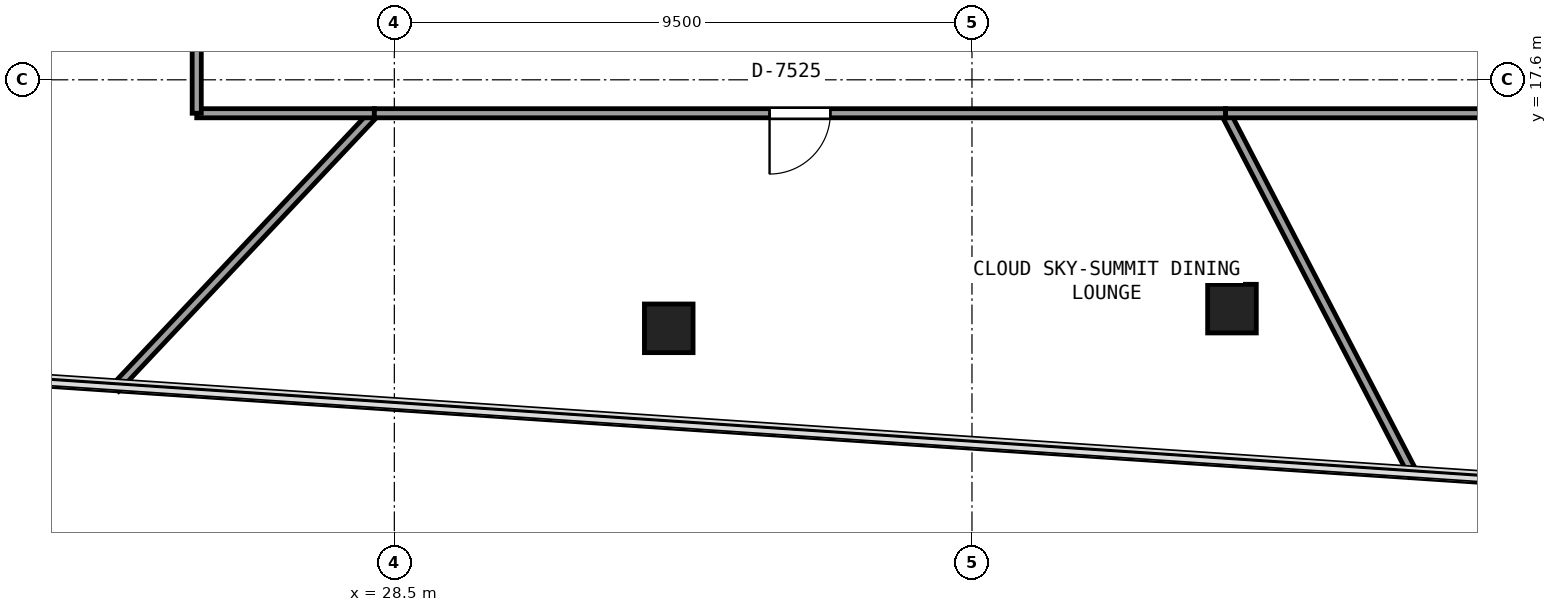
"""IFC4 building model, lengths in metres.
Left out: names, types, materials, properties, quantities, classifications, styles, units other than length and angle.
Written with IfcOpenShell. Run it as: python <this file> out.ifc"""

import sys

from ifc_helpers import new_model, si_unit, direction, frame, frame_2d, origin, origin_2d, place, context, subcontext, project, spatial, rectangle, extrude, element, fill, save


model = new_model("IFC4")
c1 = context("Model", 3, precision=1e-05, world=origin(), true_north=direction((0.0, 1.0)))
c2 = subcontext(c1, "Body", "Model", "MODEL_VIEW")
j1 = project(units=[si_unit("LENGTHUNIT", "METRE"), si_unit("PLANEANGLEUNIT", "RADIAN")], contexts=[c1])
p1 = place(None, origin())
s1 = spatial("IfcSite", under=j1, at=p1, CompositionType="ELEMENT")
p2 = place(p1, origin())
s2 = spatial("IfcBuilding", under=s1, at=p2, CompositionType="ELEMENT")
p3 = place(p2, frame((0.0, 0.0, 279.3)))
s3 = spatial("IfcBuildingStorey", under=s2, at=p3, CompositionType="ELEMENT", Elevation=279.3)
for number, where, z_axis, x_axis in (
    (1, (33.013, 13.513, 0.0), (0.0, 0.0, 1.0), (1.0, 0.0, 0.0)),
    (2, (42.276, 13.837, 0.0), (0.0, 0.0, 1.0), (1.0, 0.0, 0.0)),
):
    element("IfcColumn", number, at=place(p3, frame(where, z_axis=z_axis, x_axis=x_axis)), inside=s3, PredefinedType="COLUMN", context=c2, shape_type="SweptSolid", body=[
        extrude(rectangle(XDim=0.8, YDim=0.8, at=origin_2d()), origin(), (0.0, 0.0, 1.0), 3.84),
    ])
p4 = place(p3, frame((23.911, 12.529, 0.0), z_axis=(0.0, 0.0, 1.0), x_axis=(0.685787534891, 0.727801797874, 0.0)))
e3 = element("IfcWall", 3, at=p4, inside=s3, PredefinedType="PARTITIONING", context=c2, shape_type="SweptSolid", body=[
    extrude(rectangle(XDim=6.212, YDim=0.15, at=frame_2d((3.106, 0.0))), origin(), (0.0, 0.0, 1.0), 3.84),
])
p5 = place(p3, frame((28.171, 17.05, 0.0), z_axis=(0.0, 0.0, 1.0), x_axis=(-1.0, 0.0, 0.0)))
e4 = element("IfcWall", 4, at=p5, inside=s3, PredefinedType="PARTITIONING", context=c2, shape_type="SweptSolid", body=[
    extrude(rectangle(XDim=2.921, YDim=0.15, at=frame_2d((1.46, 0.0))), origin(), (0.0, 0.0, 1.0), 3.84),
])
p6 = place(p3, frame((25.25, 17.05, 0.0), z_axis=(0.0, 0.0, 1.0), x_axis=(0.0, 1.0, 0.0)))
e5 = element("IfcWall", 5, at=p6, inside=s3, PredefinedType="PARTITIONING", context=c2, shape_type="SweptSolid", body=[
    extrude(rectangle(XDim=15.178, YDim=0.15, at=frame_2d((7.589, 0.0))), origin(), (0.0, 0.0, 1.0), 3.289),
])
p7 = place(p6, frame((7.089, 0.0, 0.0)))
e6 = element("IfcOpeningElement", 6, at=p7, cuts=e5, PredefinedType="OPENING", context=c2, shape_type="SweptSolid", body=[
    extrude(rectangle(XDim=1.0, YDim=2.15, at=frame_2d((0.5, 1.075))), frame((0.0, 0.085, 0.0), z_axis=(0.0, -1.0, 0.0), x_axis=(1.0, 0.0, 0.0)), (0.0, 0.0, 1.0), 0.17),
])
p8 = place(p3, frame((45.263, 11.102, 0.0), z_axis=(0.0, 0.0, 1.0), x_axis=(-0.461244944401, 0.887272844882, 0.0)))
e7 = element("IfcWall", 7, at=p8, inside=s3, PredefinedType="PARTITIONING", context=c2, shape_type="SweptSolid", body=[
    extrude(rectangle(XDim=6.704, YDim=0.15, at=frame_2d((3.352, 0.0))), origin(), (0.0, 0.0, 1.0), 3.365),
])
p9 = place(p3, frame((42.171, 17.05, 0.0), z_axis=(0.0, 0.0, 1.0), x_axis=(-1.0, 0.0, 0.0)))
e8 = element("IfcWall", 8, at=p9, inside=s3, PredefinedType="PARTITIONING", context=c2, shape_type="SweptSolid", body=[
    extrude(rectangle(XDim=14.0, YDim=0.15, at=frame_2d((7.0, 0.0))), origin(), (0.0, 0.0, 1.0), 3.289),
])
p10 = place(p9, frame((6.5, 0.0, 0.0)))
e9 = element("IfcOpeningElement", 9, at=p10, cuts=e8, PredefinedType="OPENING", context=c2, shape_type="SweptSolid", body=[
    extrude(rectangle(XDim=1.0, YDim=2.15, at=frame_2d((0.5, 1.075))), frame((0.0, 0.085, 0.0), z_axis=(0.0, -1.0, 0.0), x_axis=(1.0, 0.0, 0.0)), (0.0, 0.0, 1.0), 0.17),
])
p11 = place(p3, frame((49.15, 17.05, 0.0), z_axis=(0.0, 0.0, 1.0), x_axis=(-1.0, 0.0, 0.0)))
e10 = element("IfcWall", 10, at=p11, inside=s3, PredefinedType="PARTITIONING", context=c2, shape_type="SweptSolid", body=[
    extrude(rectangle(XDim=6.979, YDim=0.15, at=frame_2d((3.49, 0.0))), origin(), (0.0, 0.0, 1.0), 3.365),
])
p12 = place(p10, origin())
e11 = element("IfcDoor", 11, at=p12, inside=s3, OperationType="SINGLE_SWING_RIGHT", PredefinedType="DOOR", context=c2, shape_type="SweptSolid", body=[
    extrude(rectangle(XDim=1.0, YDim=2.15, at=frame_2d((0.5, 1.075))), frame((0.0, 0.025, 0.0), z_axis=(0.0, -1.0, 0.0), x_axis=(1.0, 0.0, 0.0)), (0.0, 0.0, 1.0), 0.05),
])
fill(e9, e11)
save(model, sys.argv[1])
